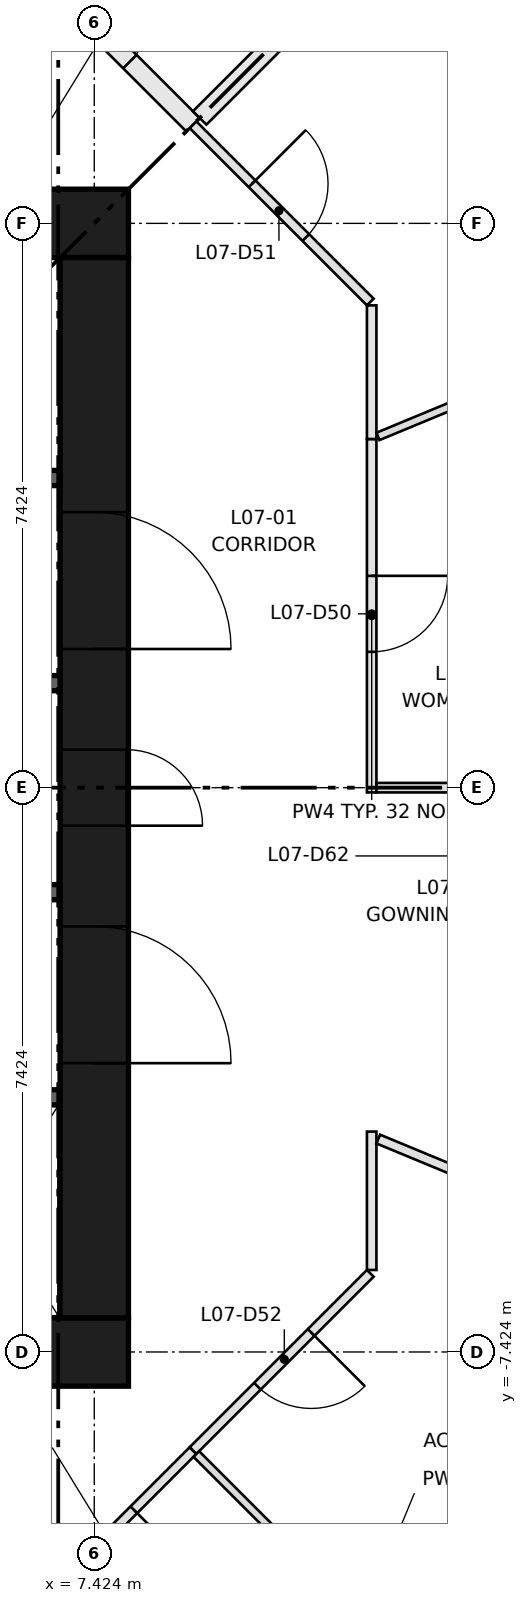
"""IFC4 building model, lengths in metres.
Left out: names, types, materials, properties, quantities, classifications, styles, units other than length and angle.
Written with IfcOpenShell. Run it as: python <this file> out.ifc"""

import sys

from ifc_helpers import new_model, si_unit, direction, frame, frame_2d, origin, place, context, subcontext, project, spatial, rectangle, extrude, element, fill, save


model = new_model("IFC4")
c1 = context("Model", 3, precision=1e-05, world=origin(), true_north=direction((0.0, 1.0)))
c2 = subcontext(c1, "Body", "Model", "MODEL_VIEW")
j1 = project(units=[si_unit("LENGTHUNIT", "METRE"), si_unit("PLANEANGLEUNIT", "RADIAN")], contexts=[c1])
p1 = place(None, origin())
s1 = spatial("IfcSite", under=j1, at=p1, CompositionType="ELEMENT")
p2 = place(p1, origin())
s2 = spatial("IfcBuilding", under=s1, at=p2, CompositionType="ELEMENT")
p3 = place(p2, frame((0.0, 0.0, 29.85)))
s3 = spatial("IfcBuildingStorey", under=s2, at=p3, CompositionType="ELEMENT", Elevation=29.85)
for number, where, z_axis, x_axis in (
    (1, (-7.874, -7.424, 0.0), (0.0, 0.0, 1.0), (1.0, 0.0, 0.0)),
    (2, (-7.874, 7.424, 0.0), (0.0, 0.0, 1.0), (1.0, 0.0, 0.0)),
):
    element("IfcWall", number, at=place(p3, frame(where, z_axis=z_axis, x_axis=x_axis)), inside=s3, PredefinedType="SHEAR", context=c2, shape_type="SweptSolid", body=[
        extrude(rectangle(XDim=15.748, YDim=0.9, at=frame_2d((7.874, 0.0))), origin(), (0.0, 0.0, 1.0), 3.65),
    ])
p4 = place(p3, frame((7.424, -6.974, 0.0), z_axis=(0.0, 0.0, 1.0), x_axis=(0.0, 1.0, 0.0)))
e3 = element("IfcWall", 3, at=p4, inside=s3, PredefinedType="SHEAR", context=c2, shape_type="SweptSolid", body=[
    extrude(rectangle(XDim=13.948, YDim=0.9, at=frame_2d((6.974, 0.0))), origin(), (0.0, 0.0, 1.0), 3.65),
])
p5 = place(p4, frame((6.474, 0.0, 0.0)))
e4 = element("IfcOpeningElement", 4, at=p5, cuts=e3, PredefinedType="OPENING", context=c2, shape_type="SweptSolid", body=[
    extrude(rectangle(XDim=1.0, YDim=2.1, at=frame_2d((0.5, 1.05))), frame((0.0, 0.46, 0.0), z_axis=(0.0, -1.0, 0.0), x_axis=(1.0, 0.0, 0.0)), (0.0, 0.0, 1.0), 0.92),
])
p6 = place(p4, frame((3.35, 0.0, 0.0)))
e5 = element("IfcOpeningElement", 5, at=p6, cuts=e3, PredefinedType="OPENING", context=c2, shape_type="SweptSolid", body=[
    extrude(rectangle(XDim=1.8, YDim=2.1, at=frame_2d((0.9, 1.05))), frame((0.0, 0.46, 0.0), z_axis=(0.0, -1.0, 0.0), x_axis=(1.0, 0.0, 0.0)), (0.0, 0.0, 1.0), 0.92),
])
p7 = place(p4, frame((8.799, 0.0, 0.0)))
e6 = element("IfcOpeningElement", 6, at=p7, cuts=e3, PredefinedType="OPENING", context=c2, shape_type="SweptSolid", body=[
    extrude(rectangle(XDim=1.8, YDim=2.1, at=frame_2d((0.9, 1.05))), frame((0.0, 0.46, 0.0), z_axis=(0.0, -1.0, 0.0), x_axis=(1.0, 0.0, 0.0)), (0.0, 0.0, 1.0), 0.92),
])
p8 = place(p3, frame((-6.974, -4.074, 0.0), z_axis=(0.0, 0.0, 1.0), x_axis=(1.0, 0.0, 0.0)))
e7 = element("IfcWall", 7, at=p8, inside=s3, PredefinedType="SHEAR", context=c2, shape_type="SweptSolid", body=[
    extrude(rectangle(XDim=13.948, YDim=0.2, at=frame_2d((6.974, 0.0))), origin(), (0.0, 0.0, 1.0), 3.3),
])
p9 = place(p8, frame((0.918, 0.0, 0.0)))
e8 = element("IfcOpeningElement", 8, at=p9, cuts=e7, PredefinedType="OPENING", context=c2, shape_type="SweptSolid", body=[
    extrude(rectangle(XDim=1.1, YDim=2.1, at=frame_2d((0.55, 1.05))), frame((0.0, 0.11, 0.0), z_axis=(0.0, -1.0, 0.0), x_axis=(1.0, 0.0, 0.0)), (0.0, 0.0, 1.0), 0.22),
])
p10 = place(p8, frame((4.055, 0.0, 0.0)))
e9 = element("IfcOpeningElement", 9, at=p10, cuts=e7, PredefinedType="OPENING", context=c2, shape_type="SweptSolid", body=[
    extrude(rectangle(XDim=1.1, YDim=2.1, at=frame_2d((0.55, 1.05))), frame((0.0, 0.11, 0.0), z_axis=(0.0, -1.0, 0.0), x_axis=(1.0, 0.0, 0.0)), (0.0, 0.0, 1.0), 0.22),
])
p11 = place(p8, frame((6.658, 0.0, 0.0)))
e10 = element("IfcOpeningElement", 10, at=p11, cuts=e7, PredefinedType="OPENING", context=c2, shape_type="SweptSolid", body=[
    extrude(rectangle(XDim=1.0, YDim=2.1, at=frame_2d((0.5, 1.05))), frame((0.0, 0.11, 0.0), z_axis=(0.0, -1.0, 0.0), x_axis=(1.0, 0.0, 0.0)), (0.0, 0.0, 1.0), 0.22),
])
p12 = place(p8, frame((8.627, 0.0, 0.0)))
e11 = element("IfcOpeningElement", 11, at=p12, cuts=e7, PredefinedType="OPENING", context=c2, shape_type="SweptSolid", body=[
    extrude(rectangle(XDim=1.0, YDim=2.1, at=frame_2d((0.5, 1.05))), frame((0.0, 0.11, 0.0), z_axis=(0.0, -1.0, 0.0), x_axis=(1.0, 0.0, 0.0)), (0.0, 0.0, 1.0), 0.22),
])
p13 = place(p8, frame((10.595, 0.0, 0.0)))
e12 = element("IfcOpeningElement", 12, at=p13, cuts=e7, PredefinedType="OPENING", context=c2, shape_type="SweptSolid", body=[
    extrude(rectangle(XDim=1.0, YDim=2.1, at=frame_2d((0.5, 1.05))), frame((0.0, 0.11, 0.0), z_axis=(0.0, -1.0, 0.0), x_axis=(1.0, 0.0, 0.0)), (0.0, 0.0, 1.0), 0.22),
])
p14 = place(p8, frame((12.564, 0.0, 0.0)))
e13 = element("IfcOpeningElement", 13, at=p14, cuts=e7, PredefinedType="OPENING", context=c2, shape_type="SweptSolid", body=[
    extrude(rectangle(XDim=1.0, YDim=2.1, at=frame_2d((0.5, 1.05))), frame((0.0, 0.11, 0.0), z_axis=(0.0, -1.0, 0.0), x_axis=(1.0, 0.0, 0.0)), (0.0, 0.0, 1.0), 0.22),
])
p15 = place(p3, frame((0.0, 4.074, 0.0), z_axis=(0.0, 0.0, 1.0), x_axis=(1.0, 0.0, 0.0)))
e14 = element("IfcWall", 14, at=p15, inside=s3, PredefinedType="SHEAR", context=c2, shape_type="SweptSolid", body=[
    extrude(rectangle(XDim=6.974, YDim=0.2, at=frame_2d((3.487, 0.0))), origin(), (0.0, 0.0, 1.0), 3.3),
])
p16 = place(p15, frame((0.43, 0.0, 0.0)))
e15 = element("IfcOpeningElement", 15, at=p16, cuts=e14, PredefinedType="OPENING", context=c2, shape_type="SweptSolid", body=[
    extrude(rectangle(XDim=1.0, YDim=2.1, at=frame_2d((0.5, 1.05))), frame((0.0, 0.11, 0.0), z_axis=(0.0, -1.0, 0.0), x_axis=(1.0, 0.0, 0.0)), (0.0, 0.0, 1.0), 0.22),
])
p17 = place(p15, frame((2.153, 0.0, 0.0)))
e16 = element("IfcOpeningElement", 16, at=p17, cuts=e14, PredefinedType="OPENING", context=c2, shape_type="SweptSolid", body=[
    extrude(rectangle(XDim=1.0, YDim=2.1, at=frame_2d((0.5, 1.05))), frame((0.0, 0.11, 0.0), z_axis=(0.0, -1.0, 0.0), x_axis=(1.0, 0.0, 0.0)), (0.0, 0.0, 1.0), 0.22),
])
p18 = place(p15, frame((3.875, 0.0, 0.0)))
e17 = element("IfcOpeningElement", 17, at=p18, cuts=e14, PredefinedType="OPENING", context=c2, shape_type="SweptSolid", body=[
    extrude(rectangle(XDim=1.0, YDim=2.1, at=frame_2d((0.5, 1.05))), frame((0.0, 0.11, 0.0), z_axis=(0.0, -1.0, 0.0), x_axis=(1.0, 0.0, 0.0)), (0.0, 0.0, 1.0), 0.22),
])
p19 = place(p15, frame((5.79, 0.0, 0.0)))
e18 = element("IfcOpeningElement", 18, at=p19, cuts=e14, PredefinedType="OPENING", context=c2, shape_type="SweptSolid", body=[
    extrude(rectangle(XDim=0.8, YDim=2.1, at=frame_2d((0.4, 1.05))), frame((0.0, 0.11, 0.0), z_axis=(0.0, -1.0, 0.0), x_axis=(1.0, 0.0, 0.0)), (0.0, 0.0, 1.0), 0.22),
])
for number, where, z_axis, x_axis in (
    (19, (4.374, -1.375, 0.0), (0.0, 0.0, 1.0), (1.0, 0.0, 0.0)),
    (20, (4.374, 1.375, 0.0), (0.0, 0.0, 1.0), (1.0, 0.0, 0.0)),
):
    element("IfcWall", number, at=place(p3, frame(where, z_axis=z_axis, x_axis=x_axis)), inside=s3, PredefinedType="SHEAR", context=c2, shape_type="SweptSolid", body=[
        extrude(rectangle(XDim=2.6, YDim=0.2, at=frame_2d((1.3, 0.0))), origin(), (0.0, 0.0, 1.0), 3.3),
    ])
p20 = place(p3, frame((11.074, 4.587, 0.0), z_axis=(0.0, 0.0, 1.0), x_axis=(0.0, -1.0, 0.0)))
e21 = element("IfcWall", 21, at=p20, inside=s3, PredefinedType="PARTITIONING", context=c2, shape_type="SweptSolid", body=[
    extrude(rectangle(XDim=4.649, YDim=0.125, at=frame_2d((2.325, 0.0))), origin(), (0.0, 0.0, 1.0), 3.3),
])
p21 = place(p20, frame((1.8, 0.0, 0.0)))
e22 = element("IfcOpeningElement", 22, at=p21, cuts=e21, PredefinedType="OPENING", context=c2, shape_type="SweptSolid", body=[
    extrude(rectangle(XDim=1.0, YDim=2.1, at=frame_2d((0.5, 1.05))), frame((0.0, 0.073, 0.0), z_axis=(0.0, -1.0, 0.0), x_axis=(1.0, 0.0, 0.0)), (0.0, 0.0, 1.0), 0.145),
])
p22 = place(p3, frame((8.722, 8.722, 0.0), z_axis=(0.0, 0.0, 1.0), x_axis=(0.707143776336, -0.707069784102, 0.0)))
e23 = element("IfcWall", 23, at=p22, inside=s3, PredefinedType="PARTITIONING", context=c2, shape_type="SweptSolid", body=[
    extrude(rectangle(XDim=3.3, YDim=0.125, at=frame_2d((1.65, 0.0))), origin(), (0.0, 0.0, 1.0), 3.3),
])
p23 = place(p22, frame((1.1, 0.0, 0.0)))
e24 = element("IfcOpeningElement", 24, at=p23, cuts=e23, PredefinedType="OPENING", context=c2, shape_type="SweptSolid", body=[
    extrude(rectangle(XDim=1.0, YDim=2.1, at=frame_2d((0.5, 1.05))), frame((0.0, 0.073, 0.0), z_axis=(0.0, -1.0, 0.0), x_axis=(1.0, 0.0, 0.0)), (0.0, 0.0, 1.0), 0.145),
])
p24 = place(p3, frame((11.074, 6.345, 0.0), z_axis=(0.0, 0.0, 1.0), x_axis=(0.0, -1.0, 0.0)))
e25 = element("IfcWall", 25, at=p24, inside=s3, PredefinedType="PARTITIONING", context=c2, shape_type="SweptSolid", body=[
    extrude(rectangle(XDim=1.758, YDim=0.125, at=frame_2d((0.879, 0.0))), origin(), (0.0, 0.0, 1.0), 3.3),
])
p25 = place(p3, frame((11.056, -6.389, 0.0), z_axis=(0.0, 0.0, 1.0), x_axis=(-0.707143776336, -0.707069784102, 0.0)))
e26 = element("IfcWall", 26, at=p25, inside=s3, PredefinedType="PARTITIONING", context=c2, shape_type="SweptSolid", body=[
    extrude(rectangle(XDim=3.3, YDim=0.125, at=frame_2d((1.65, 0.0))), origin(), (0.0, 0.0, 1.0), 3.3),
])
p26 = place(p25, frame((1.1, 0.0, 0.0)))
e27 = element("IfcOpeningElement", 27, at=p26, cuts=e26, PredefinedType="OPENING", context=c2, shape_type="SweptSolid", body=[
    extrude(rectangle(XDim=1.0, YDim=2.1, at=frame_2d((0.5, 1.05))), frame((0.0, 0.073, 0.0), z_axis=(0.0, -1.0, 0.0), x_axis=(1.0, 0.0, 0.0)), (0.0, 0.0, 1.0), 0.145),
])
p27 = place(p3, frame((11.074, -4.524, 0.0), z_axis=(0.0, 0.0, 1.0), x_axis=(0.0, -1.0, 0.0)))
e28 = element("IfcWall", 28, at=p27, inside=s3, PredefinedType="PARTITIONING", context=c2, shape_type="SweptSolid", body=[
    extrude(rectangle(XDim=1.821, YDim=0.125, at=frame_2d((0.91, 0.0))), origin(), (0.0, 0.0, 1.0), 3.3),
])
p28 = place(p3, frame((6.408, 11.037, 0.0), z_axis=(0.0, 0.0, 1.0), x_axis=(0.707069491442, -0.707144068965, 0.0)))
e29 = element("IfcWall", 29, at=p28, inside=s3, PredefinedType="PARTITIONING", context=c2, shape_type="SweptSolid", body=[
    extrude(rectangle(XDim=3.274, YDim=0.25, at=frame_2d((1.637, 0.0))), origin(), (0.0, 0.0, 1.0), 3.3),
])
p29 = place(p28, frame((1.1, 0.0, 0.0)))
e30 = element("IfcOpeningElement", 30, at=p29, cuts=e29, PredefinedType="OPENING", context=c2, shape_type="SweptSolid", body=[
    extrude(rectangle(XDim=1.0, YDim=2.1, at=frame_2d((0.5, 1.05))), frame((0.0, 0.135, 0.0), z_axis=(0.0, -1.0, 0.0), x_axis=(1.0, 0.0, 0.0)), (0.0, 0.0, 1.0), 0.27),
])
p30 = place(p3, frame((8.722, -8.722, 0.0), z_axis=(0.0, 0.0, 1.0), x_axis=(-0.707069784102, -0.707143776336, 0.0)))
e31 = element("IfcWall", 31, at=p30, inside=s3, PredefinedType="PARTITIONING", context=c2, shape_type="SweptSolid", body=[
    extrude(rectangle(XDim=3.3, YDim=0.125, at=frame_2d((1.65, 0.0))), origin(), (0.0, 0.0, 1.0), 3.3),
])
p31 = place(p30, frame((1.1, 0.0, 0.0)))
e32 = element("IfcOpeningElement", 32, at=p31, cuts=e31, PredefinedType="OPENING", context=c2, shape_type="SweptSolid", body=[
    extrude(rectangle(XDim=1.0, YDim=2.1, at=frame_2d((0.5, 1.05))), frame((0.0, 0.073, 0.0), z_axis=(0.0, -1.0, 0.0), x_axis=(1.0, 0.0, 0.0)), (0.0, 0.0, 1.0), 0.145),
])
p32 = place(p3, frame((11.156, 4.621, 0.0), z_axis=(0.0, 0.0, 1.0), x_axis=(0.923813438205, 0.382842959178, 0.0)))
e33 = element("IfcWall", 33, at=p32, inside=s3, PredefinedType="PARTITIONING", context=c2, shape_type="SweptSolid", body=[
    extrude(rectangle(XDim=1.624, YDim=0.105, at=frame_2d((0.812, 0.0))), origin(), (0.0, 0.0, 1.0), 3.3),
])
p33 = place(p3, frame((13.633, 0.0, 0.0), z_axis=(0.0, 0.0, 1.0), x_axis=(-1.0, 0.0, 0.0)))
e34 = element("IfcWall", 34, at=p33, inside=s3, PredefinedType="PARTITIONING", context=c2, shape_type="SweptSolid", body=[
    extrude(rectangle(XDim=2.497, YDim=0.125, at=frame_2d((1.249, 0.0))), origin(), (0.0, 0.0, 1.0), 3.3),
])
p34 = place(p3, frame((13.131, 13.131, 0.0), z_axis=(0.0, 0.0, 1.0), x_axis=(-0.707106781187, -0.707106781187, 0.0)))
e35 = element("IfcWall", 35, at=p34, inside=s3, PredefinedType="PARTITIONING", context=c2, shape_type="SweptSolid", body=[
    extrude(rectangle(XDim=6.11, YDim=0.25, at=frame_2d((3.055, 0.0))), origin(), (0.0, 0.0, 1.0), 3.3),
])
p35 = place(p3, frame((8.767, -8.767, 0.0), z_axis=(0.0, 0.0, 1.0), x_axis=(0.707106781187, -0.707106781187, 0.0)))
e36 = element("IfcWall", 36, at=p35, inside=s3, PredefinedType="PARTITIONING", context=c2, shape_type="SweptSolid", body=[
    extrude(rectangle(XDim=6.172, YDim=0.105, at=frame_2d((3.086, 0.0))), origin(), (0.0, 0.0, 1.0), 3.3),
])
p36 = place(p3, frame((11.16, -4.623, 0.0), z_axis=(0.0, 0.0, 1.0), x_axis=(0.92383312361, -0.382795454155, 0.0)))
e37 = element("IfcWall", 37, at=p36, inside=s3, PredefinedType="PARTITIONING", context=c2, shape_type="SweptSolid", body=[
    extrude(rectangle(XDim=1.62, YDim=0.125, at=frame_2d((0.81, 0.0))), origin(), (0.0, 0.0, 1.0), 3.3),
])
p37 = place(p5, frame((1.0, 0.0, 0.0), z_axis=(0.0, 0.0, 1.0), x_axis=(-1.0, 0.0, 0.0)))
e38 = element("IfcDoor", 38, at=p37, inside=s3, OperationType="SINGLE_SWING_LEFT", PredefinedType="DOOR", context=c2, shape_type="SweptSolid", body=[
    extrude(rectangle(XDim=1.0, YDim=2.1, at=frame_2d((0.5, 1.05))), frame((0.0, 0.45, 0.0), z_axis=(0.0, -1.0, 0.0), x_axis=(1.0, 0.0, 0.0)), (0.0, 0.0, 1.0), 0.05),
])
fill(e4, e38)
p38 = place(p6, frame((1.8, 0.0, 0.0), z_axis=(0.0, 0.0, 1.0), x_axis=(-1.0, 0.0, 0.0)))
e39 = element("IfcDoor", 39, at=p38, inside=s3, OperationType="DOUBLE_DOOR_SINGLE_SWING", PredefinedType="DOOR", context=c2, shape_type="SweptSolid", body=[
    extrude(rectangle(XDim=1.8, YDim=2.1, at=frame_2d((0.9, 1.05))), frame((0.0, 0.025, 0.0), z_axis=(0.0, -1.0, 0.0), x_axis=(1.0, 0.0, 0.0)), (0.0, 0.0, 1.0), 0.05),
])
fill(e5, e39)
p39 = place(p7, frame((1.8, 0.0, 0.0), z_axis=(0.0, 0.0, 1.0), x_axis=(-1.0, 0.0, 0.0)))
e40 = element("IfcDoor", 40, at=p39, inside=s3, OperationType="DOUBLE_DOOR_SINGLE_SWING", PredefinedType="DOOR", context=c2, shape_type="SweptSolid", body=[
    extrude(rectangle(XDim=1.8, YDim=2.1, at=frame_2d((0.9, 1.05))), frame((0.0, 0.025, 0.0), z_axis=(0.0, -1.0, 0.0), x_axis=(1.0, 0.0, 0.0)), (0.0, 0.0, 1.0), 0.05),
])
fill(e6, e40)
p40 = place(p21, origin())
e41 = element("IfcDoor", 41, at=p40, inside=s3, OperationType="SINGLE_SWING_LEFT", PredefinedType="DOOR", context=c2, shape_type="SweptSolid", body=[
    extrude(rectangle(XDim=1.0, YDim=2.1, at=frame_2d((0.5, 1.05))), frame((0.0, 0.025, 0.0), z_axis=(0.0, -1.0, 0.0), x_axis=(1.0, 0.0, 0.0)), (0.0, 0.0, 1.0), 0.05),
])
fill(e22, e41)
p41 = place(p23, origin())
e42 = element("IfcDoor", 42, at=p41, inside=s3, OperationType="SINGLE_SWING_LEFT", PredefinedType="DOOR", context=c2, shape_type="SweptSolid", body=[
    extrude(rectangle(XDim=1.0, YDim=2.1, at=frame_2d((0.5, 1.05))), frame((0.0, 0.025, 0.0), z_axis=(0.0, -1.0, 0.0), x_axis=(1.0, 0.0, 0.0)), (0.0, 0.0, 1.0), 0.05),
])
fill(e24, e42)
p42 = place(p26, origin())
e43 = element("IfcDoor", 43, at=p42, inside=s3, OperationType="SINGLE_SWING_LEFT", PredefinedType="DOOR", context=c2, shape_type="SweptSolid", body=[
    extrude(rectangle(XDim=1.0, YDim=2.1, at=frame_2d((0.5, 1.05))), frame((0.0, 0.025, 0.0), z_axis=(0.0, -1.0, 0.0), x_axis=(1.0, 0.0, 0.0)), (0.0, 0.0, 1.0), 0.05),
])
fill(e27, e43)
p43 = place(p29, origin())
e44 = element("IfcDoor", 44, at=p43, inside=s3, OperationType="SINGLE_SWING_LEFT", PredefinedType="DOOR", context=c2, shape_type="SweptSolid", body=[
    extrude(rectangle(XDim=1.0, YDim=2.1, at=frame_2d((0.5, 1.05))), frame((0.0, 0.025, 0.0), z_axis=(0.0, -1.0, 0.0), x_axis=(1.0, 0.0, 0.0)), (0.0, 0.0, 1.0), 0.05),
])
fill(e30, e44)
p44 = place(p31, origin())
e45 = element("IfcDoor", 45, at=p44, inside=s3, OperationType="SINGLE_SWING_LEFT", PredefinedType="DOOR", context=c2, shape_type="SweptSolid", body=[
    extrude(rectangle(XDim=1.0, YDim=2.1, at=frame_2d((0.5, 1.05))), frame((0.0, 0.025, 0.0), z_axis=(0.0, -1.0, 0.0), x_axis=(1.0, 0.0, 0.0)), (0.0, 0.0, 1.0), 0.05),
])
fill(e32, e45)
save(model, sys.argv[1])
